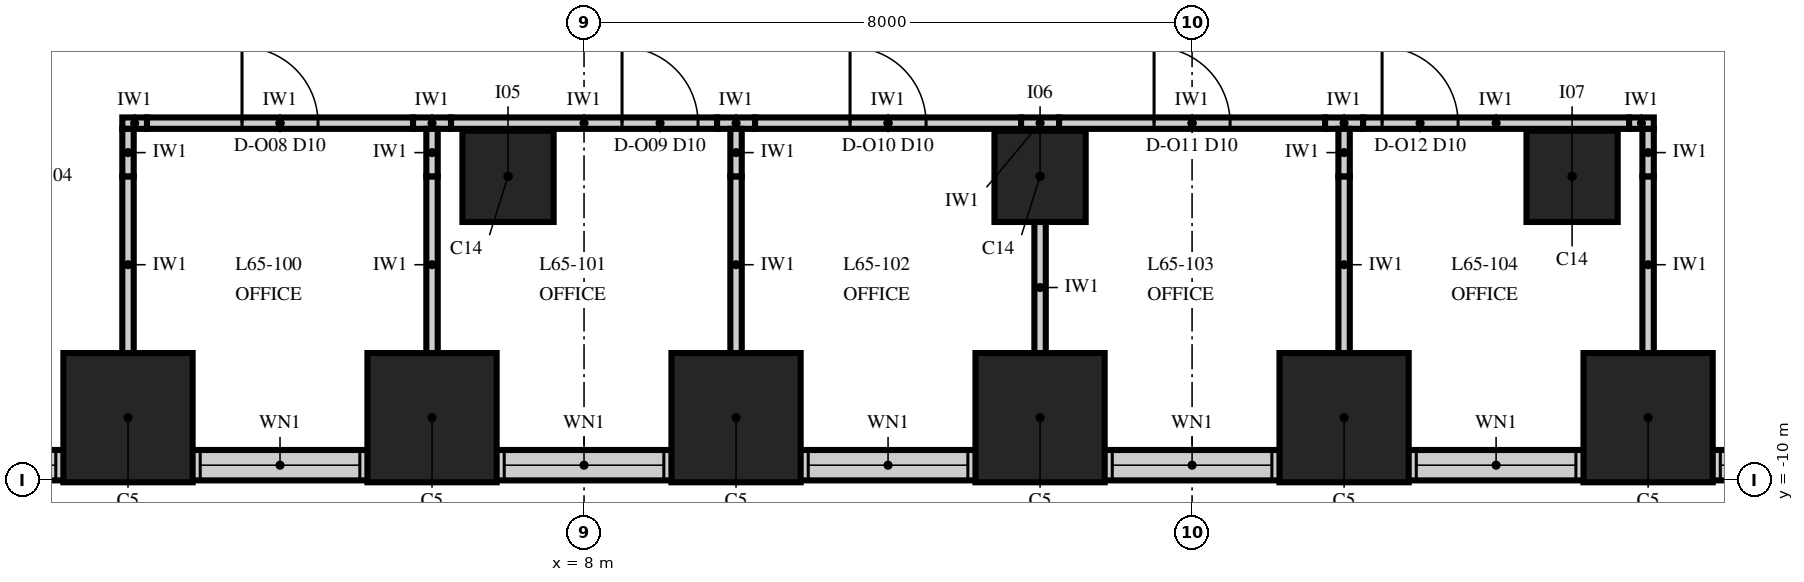
"""IFC4 building model, lengths in metres.
Left out: names, types, materials, properties, quantities, classifications, styles, units other than length and angle.
Written with IfcOpenShell. Run it as: python <this file> out.ifc"""

import sys

from ifc_helpers import new_model, si_unit, direction, frame, frame_2d, origin, origin_2d, place, context, subcontext, project, spatial, rectangle, extrude, element, fill, save


model = new_model("IFC4")
c1 = context("Model", 3, precision=1e-05, world=origin(), true_north=direction((0.0, 1.0)))
c2 = subcontext(c1, "Body", "Model", "MODEL_VIEW")
j1 = project(units=[si_unit("LENGTHUNIT", "METRE"), si_unit("PLANEANGLEUNIT", "RADIAN")], contexts=[c1])
p1 = place(None, origin())
s1 = spatial("IfcSite", under=j1, at=p1, CompositionType="ELEMENT")
p2 = place(p1, origin())
s2 = spatial("IfcBuilding", under=s1, at=p2, CompositionType="ELEMENT")
p3 = place(p2, frame((0.0, 0.0, 280.0)))
s3 = spatial("IfcBuildingStorey", under=s2, at=p3, CompositionType="ELEMENT", Elevation=280.0)
for number, where, z_axis, x_axis in (
    (1, (2.0, -9.175, 0.0), (0.0, 0.0, 1.0), (1.0, 0.0, 0.0)),
    (2, (6.0, -9.175, 0.0), (0.0, 0.0, 1.0), (1.0, 0.0, 0.0)),
    (3, (10.0, -9.175, 0.0), (0.0, 0.0, 1.0), (1.0, 0.0, 0.0)),
    (4, (14.0, -9.175, 0.0), (0.0, 0.0, 1.0), (1.0, 0.0, 0.0)),
    (5, (18.0, -9.175, 0.0), (0.0, 0.0, 1.0), (1.0, 0.0, 0.0)),
    (6, (22.0, -9.175, 0.0), (0.0, 0.0, 1.0), (1.0, 0.0, 0.0)),
):
    element("IfcColumn", number, at=place(p3, frame(where, z_axis=z_axis, x_axis=x_axis)), inside=s3, PredefinedType="COLUMN", context=c2, shape_type="SweptSolid", body=[
        extrude(rectangle(XDim=1.7, YDim=1.7, at=origin_2d()), origin(), (0.0, 0.0, 1.0), 4.0),
    ])
for number, where, z_axis, x_axis in (
    (7, (7.0, -6.0, 0.0), (0.0, 0.0, 1.0), (1.0, 0.0, 0.0)),
    (8, (14.0, -6.0, 0.0), (0.0, 0.0, 1.0), (1.0, 0.0, 0.0)),
    (9, (21.0, -6.0, 0.0), (0.0, 0.0, 1.0), (1.0, 0.0, 0.0)),
):
    element("IfcColumn", number, at=place(p3, frame(where, z_axis=z_axis, x_axis=x_axis)), inside=s3, PredefinedType="COLUMN", context=c2, shape_type="SweptSolid", body=[
        extrude(rectangle(XDim=1.2, YDim=1.2, at=origin_2d()), origin(), (0.0, 0.0, 1.0), 4.0),
    ])
p4 = place(p3, frame((-26.0, -9.8, 0.0), z_axis=(0.0, 0.0, 1.0), x_axis=(1.0, 0.0, 0.0)))
e10 = element("IfcWall", 10, at=p4, inside=s3, PredefinedType="SOLIDWALL", context=c2, shape_type="SweptSolid", body=[
    extrude(rectangle(XDim=52.0, YDim=0.4, at=frame_2d((26.0, 0.0))), origin(), (0.0, 0.0, 1.0), 2.0),
])
p5 = place(p4, frame((0.95, 0.0, 0.8)))
e11 = element("IfcOpeningElement", 11, at=p5, cuts=e10, PredefinedType="OPENING", context=c2, shape_type="SweptSolid", body=[
    extrude(rectangle(XDim=2.1, YDim=1.15, at=frame_2d((1.05, 0.575))), frame((0.0, 0.215, 0.0), z_axis=(0.0, -1.0, 0.0), x_axis=(1.0, 0.0, 0.0)), (0.0, 0.0, 1.0), 0.43),
])
p6 = place(p4, frame((4.95, 0.0, 0.8)))
e12 = element("IfcOpeningElement", 12, at=p6, cuts=e10, PredefinedType="OPENING", context=c2, shape_type="SweptSolid", body=[
    extrude(rectangle(XDim=2.1, YDim=1.15, at=frame_2d((1.05, 0.575))), frame((0.0, 0.215, 0.0), z_axis=(0.0, -1.0, 0.0), x_axis=(1.0, 0.0, 0.0)), (0.0, 0.0, 1.0), 0.43),
])
p7 = place(p4, frame((8.95, 0.0, 0.8)))
e13 = element("IfcOpeningElement", 13, at=p7, cuts=e10, PredefinedType="OPENING", context=c2, shape_type="SweptSolid", body=[
    extrude(rectangle(XDim=2.1, YDim=1.15, at=frame_2d((1.05, 0.575))), frame((0.0, 0.215, 0.0), z_axis=(0.0, -1.0, 0.0), x_axis=(1.0, 0.0, 0.0)), (0.0, 0.0, 1.0), 0.43),
])
p8 = place(p4, frame((12.95, 0.0, 0.8)))
e14 = element("IfcOpeningElement", 14, at=p8, cuts=e10, PredefinedType="OPENING", context=c2, shape_type="SweptSolid", body=[
    extrude(rectangle(XDim=2.1, YDim=1.15, at=frame_2d((1.05, 0.575))), frame((0.0, 0.215, 0.0), z_axis=(0.0, -1.0, 0.0), x_axis=(1.0, 0.0, 0.0)), (0.0, 0.0, 1.0), 0.43),
])
p9 = place(p4, frame((16.95, 0.0, 0.8)))
e15 = element("IfcOpeningElement", 15, at=p9, cuts=e10, PredefinedType="OPENING", context=c2, shape_type="SweptSolid", body=[
    extrude(rectangle(XDim=2.1, YDim=1.15, at=frame_2d((1.05, 0.575))), frame((0.0, 0.215, 0.0), z_axis=(0.0, -1.0, 0.0), x_axis=(1.0, 0.0, 0.0)), (0.0, 0.0, 1.0), 0.43),
])
p10 = place(p4, frame((20.95, 0.0, 0.8)))
e16 = element("IfcOpeningElement", 16, at=p10, cuts=e10, PredefinedType="OPENING", context=c2, shape_type="SweptSolid", body=[
    extrude(rectangle(XDim=2.1, YDim=1.15, at=frame_2d((1.05, 0.575))), frame((0.0, 0.215, 0.0), z_axis=(0.0, -1.0, 0.0), x_axis=(1.0, 0.0, 0.0)), (0.0, 0.0, 1.0), 0.43),
])
p11 = place(p4, frame((24.95, 0.0, 0.8)))
e17 = element("IfcOpeningElement", 17, at=p11, cuts=e10, PredefinedType="OPENING", context=c2, shape_type="SweptSolid", body=[
    extrude(rectangle(XDim=2.1, YDim=1.15, at=frame_2d((1.05, 0.575))), frame((0.0, 0.215, 0.0), z_axis=(0.0, -1.0, 0.0), x_axis=(1.0, 0.0, 0.0)), (0.0, 0.0, 1.0), 0.43),
])
p12 = place(p4, frame((28.95, 0.0, 0.8)))
e18 = element("IfcOpeningElement", 18, at=p12, cuts=e10, PredefinedType="OPENING", context=c2, shape_type="SweptSolid", body=[
    extrude(rectangle(XDim=2.1, YDim=1.15, at=frame_2d((1.05, 0.575))), frame((0.0, 0.215, 0.0), z_axis=(0.0, -1.0, 0.0), x_axis=(1.0, 0.0, 0.0)), (0.0, 0.0, 1.0), 0.43),
])
p13 = place(p4, frame((32.95, 0.0, 0.8)))
e19 = element("IfcOpeningElement", 19, at=p13, cuts=e10, PredefinedType="OPENING", context=c2, shape_type="SweptSolid", body=[
    extrude(rectangle(XDim=2.1, YDim=1.15, at=frame_2d((1.05, 0.575))), frame((0.0, 0.215, 0.0), z_axis=(0.0, -1.0, 0.0), x_axis=(1.0, 0.0, 0.0)), (0.0, 0.0, 1.0), 0.43),
])
p14 = place(p4, frame((36.95, 0.0, 0.8)))
e20 = element("IfcOpeningElement", 20, at=p14, cuts=e10, PredefinedType="OPENING", context=c2, shape_type="SweptSolid", body=[
    extrude(rectangle(XDim=2.1, YDim=1.15, at=frame_2d((1.05, 0.575))), frame((0.0, 0.215, 0.0), z_axis=(0.0, -1.0, 0.0), x_axis=(1.0, 0.0, 0.0)), (0.0, 0.0, 1.0), 0.43),
])
p15 = place(p4, frame((40.95, 0.0, 0.8)))
e21 = element("IfcOpeningElement", 21, at=p15, cuts=e10, PredefinedType="OPENING", context=c2, shape_type="SweptSolid", body=[
    extrude(rectangle(XDim=2.1, YDim=1.15, at=frame_2d((1.05, 0.575))), frame((0.0, 0.215, 0.0), z_axis=(0.0, -1.0, 0.0), x_axis=(1.0, 0.0, 0.0)), (0.0, 0.0, 1.0), 0.43),
])
p16 = place(p4, frame((44.95, 0.0, 0.8)))
e22 = element("IfcOpeningElement", 22, at=p16, cuts=e10, PredefinedType="OPENING", context=c2, shape_type="SweptSolid", body=[
    extrude(rectangle(XDim=2.1, YDim=1.15, at=frame_2d((1.05, 0.575))), frame((0.0, 0.215, 0.0), z_axis=(0.0, -1.0, 0.0), x_axis=(1.0, 0.0, 0.0)), (0.0, 0.0, 1.0), 0.43),
])
p17 = place(p4, frame((48.95, 0.0, 0.8)))
e23 = element("IfcOpeningElement", 23, at=p17, cuts=e10, PredefinedType="OPENING", context=c2, shape_type="SweptSolid", body=[
    extrude(rectangle(XDim=2.1, YDim=1.15, at=frame_2d((1.05, 0.575))), frame((0.0, 0.215, 0.0), z_axis=(0.0, -1.0, 0.0), x_axis=(1.0, 0.0, 0.0)), (0.0, 0.0, 1.0), 0.43),
])
p18 = place(p3, frame((1.925, -5.3, 0.0), z_axis=(0.0, 0.0, 1.0), x_axis=(1.0, 0.0, 0.0)))
e24 = element("IfcWall", 24, at=p18, inside=s3, PredefinedType="PARTITIONING", context=c2, shape_type="SweptSolid", body=[
    extrude(rectangle(XDim=0.325, YDim=0.15, at=frame_2d((0.163, 0.0))), origin(), (0.0, 0.0, 1.0), 2.25),
])
p19 = place(p3, frame((2.25, -5.3, 0.0), z_axis=(0.0, 0.0, 1.0), x_axis=(1.0, 0.0, 0.0)))
e25 = element("IfcWall", 25, at=p19, inside=s3, PredefinedType="PARTITIONING", context=c2, shape_type="SweptSolid", body=[
    extrude(rectangle(XDim=3.5, YDim=0.15, at=frame_2d((1.75, 0.0))), origin(), (0.0, 0.0, 1.0), 3.85),
])
p20 = place(p19, frame((1.25, 0.0, 0.0)))
e26 = element("IfcOpeningElement", 26, at=p20, cuts=e25, PredefinedType="OPENING", context=c2, shape_type="SweptSolid", body=[
    extrude(rectangle(XDim=1.0, YDim=2.3, at=frame_2d((0.5, 1.15))), frame((0.0, 0.09, 0.0), z_axis=(0.0, -1.0, 0.0), x_axis=(1.0, 0.0, 0.0)), (0.0, 0.0, 1.0), 0.18),
])
p21 = place(p3, frame((5.75, -5.3, 0.0), z_axis=(0.0, 0.0, 1.0), x_axis=(1.0, 0.0, 0.0)))
e27 = element("IfcWall", 27, at=p21, inside=s3, PredefinedType="PARTITIONING", context=c2, shape_type="SweptSolid", body=[
    extrude(rectangle(XDim=0.5, YDim=0.15, at=frame_2d((0.25, 0.0))), origin(), (0.0, 0.0, 1.0), 2.25),
])
p22 = place(p3, frame((6.25, -5.3, 0.0), z_axis=(0.0, 0.0, 1.0), x_axis=(1.0, 0.0, 0.0)))
e28 = element("IfcWall", 28, at=p22, inside=s3, PredefinedType="PARTITIONING", context=c2, shape_type="SweptSolid", body=[
    extrude(rectangle(XDim=3.5, YDim=0.15, at=frame_2d((1.75, 0.0))), origin(), (0.0, 0.0, 1.0), 3.85),
])
p23 = place(p22, frame((2.25, 0.0, 0.0)))
e29 = element("IfcOpeningElement", 29, at=p23, cuts=e28, PredefinedType="OPENING", context=c2, shape_type="SweptSolid", body=[
    extrude(rectangle(XDim=1.0, YDim=2.3, at=frame_2d((0.5, 1.15))), frame((0.0, 0.09, 0.0), z_axis=(0.0, -1.0, 0.0), x_axis=(1.0, 0.0, 0.0)), (0.0, 0.0, 1.0), 0.18),
])
p24 = place(p3, frame((9.75, -5.3, 0.0), z_axis=(0.0, 0.0, 1.0), x_axis=(1.0, 0.0, 0.0)))
e30 = element("IfcWall", 30, at=p24, inside=s3, PredefinedType="PARTITIONING", context=c2, shape_type="SweptSolid", body=[
    extrude(rectangle(XDim=0.5, YDim=0.15, at=frame_2d((0.25, 0.0))), origin(), (0.0, 0.0, 1.0), 2.25),
])
p25 = place(p3, frame((10.25, -5.3, 0.0), z_axis=(0.0, 0.0, 1.0), x_axis=(1.0, 0.0, 0.0)))
e31 = element("IfcWall", 31, at=p25, inside=s3, PredefinedType="PARTITIONING", context=c2, shape_type="SweptSolid", body=[
    extrude(rectangle(XDim=3.5, YDim=0.15, at=frame_2d((1.75, 0.0))), origin(), (0.0, 0.0, 1.0), 3.85),
])
p26 = place(p25, frame((1.25, 0.0, 0.0)))
e32 = element("IfcOpeningElement", 32, at=p26, cuts=e31, PredefinedType="OPENING", context=c2, shape_type="SweptSolid", body=[
    extrude(rectangle(XDim=1.0, YDim=2.3, at=frame_2d((0.5, 1.15))), frame((0.0, 0.09, 0.0), z_axis=(0.0, -1.0, 0.0), x_axis=(1.0, 0.0, 0.0)), (0.0, 0.0, 1.0), 0.18),
])
p27 = place(p3, frame((13.75, -5.3, 0.0), z_axis=(0.0, 0.0, 1.0), x_axis=(1.0, 0.0, 0.0)))
e33 = element("IfcWall", 33, at=p27, inside=s3, PredefinedType="PARTITIONING", context=c2, shape_type="SweptSolid", body=[
    extrude(rectangle(XDim=0.5, YDim=0.15, at=frame_2d((0.25, 0.0))), origin(), (0.0, 0.0, 1.0), 2.25),
])
p28 = place(p3, frame((14.25, -5.3, 0.0), z_axis=(0.0, 0.0, 1.0), x_axis=(1.0, 0.0, 0.0)))
e34 = element("IfcWall", 34, at=p28, inside=s3, PredefinedType="PARTITIONING", context=c2, shape_type="SweptSolid", body=[
    extrude(rectangle(XDim=3.5, YDim=0.15, at=frame_2d((1.75, 0.0))), origin(), (0.0, 0.0, 1.0), 3.85),
])
p29 = place(p28, frame((1.25, 0.0, 0.0)))
e35 = element("IfcOpeningElement", 35, at=p29, cuts=e34, PredefinedType="OPENING", context=c2, shape_type="SweptSolid", body=[
    extrude(rectangle(XDim=1.0, YDim=2.3, at=frame_2d((0.5, 1.15))), frame((0.0, 0.09, 0.0), z_axis=(0.0, -1.0, 0.0), x_axis=(1.0, 0.0, 0.0)), (0.0, 0.0, 1.0), 0.18),
])
p30 = place(p3, frame((17.75, -5.3, 0.0), z_axis=(0.0, 0.0, 1.0), x_axis=(1.0, 0.0, 0.0)))
e36 = element("IfcWall", 36, at=p30, inside=s3, PredefinedType="PARTITIONING", context=c2, shape_type="SweptSolid", body=[
    extrude(rectangle(XDim=0.5, YDim=0.15, at=frame_2d((0.25, 0.0))), origin(), (0.0, 0.0, 1.0), 2.25),
])
p31 = place(p3, frame((18.25, -5.3, 0.0), z_axis=(0.0, 0.0, 1.0), x_axis=(1.0, 0.0, 0.0)))
e37 = element("IfcWall", 37, at=p31, inside=s3, PredefinedType="PARTITIONING", context=c2, shape_type="SweptSolid", body=[
    extrude(rectangle(XDim=3.5, YDim=0.15, at=frame_2d((1.75, 0.0))), origin(), (0.0, 0.0, 1.0), 3.85),
])
p32 = place(p31, frame((0.25, 0.0, 0.0)))
e38 = element("IfcOpeningElement", 38, at=p32, cuts=e37, PredefinedType="OPENING", context=c2, shape_type="SweptSolid", body=[
    extrude(rectangle(XDim=1.0, YDim=2.3, at=frame_2d((0.5, 1.15))), frame((0.0, 0.09, 0.0), z_axis=(0.0, -1.0, 0.0), x_axis=(1.0, 0.0, 0.0)), (0.0, 0.0, 1.0), 0.18),
])
p33 = place(p3, frame((21.75, -5.3, 0.0), z_axis=(0.0, 0.0, 1.0), x_axis=(1.0, 0.0, 0.0)))
e39 = element("IfcWall", 39, at=p33, inside=s3, PredefinedType="PARTITIONING", context=c2, shape_type="SweptSolid", body=[
    extrude(rectangle(XDim=0.325, YDim=0.15, at=frame_2d((0.163, 0.0))), origin(), (0.0, 0.0, 1.0), 2.25),
])
p34 = place(p3, frame((2.0, -8.325, 0.0), z_axis=(0.0, 0.0, 1.0), x_axis=(0.0, 1.0, 0.0)))
e40 = element("IfcWall", 40, at=p34, inside=s3, PredefinedType="PARTITIONING", context=c2, shape_type="SweptSolid", body=[
    extrude(rectangle(XDim=2.325, YDim=0.15, at=frame_2d((1.163, 0.0))), origin(), (0.0, 0.0, 1.0), 2.75),
])
p35 = place(p3, frame((2.0, -6.0, 0.0), z_axis=(0.0, 0.0, 1.0), x_axis=(0.0, 1.0, 0.0)))
e41 = element("IfcWall", 41, at=p35, inside=s3, PredefinedType="PARTITIONING", context=c2, shape_type="SweptSolid", body=[
    extrude(rectangle(XDim=0.625, YDim=0.15, at=frame_2d((0.312, 0.0))), origin(), (0.0, 0.0, 1.0), 2.25),
])
p36 = place(p3, frame((6.0, -8.325, 0.0), z_axis=(0.0, 0.0, 1.0), x_axis=(0.0, 1.0, 0.0)))
e42 = element("IfcWall", 42, at=p36, inside=s3, PredefinedType="PARTITIONING", context=c2, shape_type="SweptSolid", body=[
    extrude(rectangle(XDim=2.325, YDim=0.15, at=frame_2d((1.163, 0.0))), origin(), (0.0, 0.0, 1.0), 2.75),
])
p37 = place(p3, frame((6.0, -6.0, 0.0), z_axis=(0.0, 0.0, 1.0), x_axis=(0.0, 1.0, 0.0)))
e43 = element("IfcWall", 43, at=p37, inside=s3, PredefinedType="PARTITIONING", context=c2, shape_type="SweptSolid", body=[
    extrude(rectangle(XDim=0.625, YDim=0.15, at=frame_2d((0.312, 0.0))), origin(), (0.0, 0.0, 1.0), 2.25),
])
p38 = place(p3, frame((10.0, -8.325, 0.0), z_axis=(0.0, 0.0, 1.0), x_axis=(0.0, 1.0, 0.0)))
e44 = element("IfcWall", 44, at=p38, inside=s3, PredefinedType="PARTITIONING", context=c2, shape_type="SweptSolid", body=[
    extrude(rectangle(XDim=2.325, YDim=0.15, at=frame_2d((1.163, 0.0))), origin(), (0.0, 0.0, 1.0), 2.75),
])
p39 = place(p3, frame((10.0, -6.0, 0.0), z_axis=(0.0, 0.0, 1.0), x_axis=(0.0, 1.0, 0.0)))
e45 = element("IfcWall", 45, at=p39, inside=s3, PredefinedType="PARTITIONING", context=c2, shape_type="SweptSolid", body=[
    extrude(rectangle(XDim=0.625, YDim=0.15, at=frame_2d((0.312, 0.0))), origin(), (0.0, 0.0, 1.0), 2.25),
])
p40 = place(p3, frame((14.0, -8.325, 0.0), z_axis=(0.0, 0.0, 1.0), x_axis=(0.0, 1.0, 0.0)))
e46 = element("IfcWall", 46, at=p40, inside=s3, PredefinedType="PARTITIONING", context=c2, shape_type="SweptSolid", body=[
    extrude(rectangle(XDim=1.725, YDim=0.15, at=frame_2d((0.862, 0.0))), origin(), (0.0, 0.0, 1.0), 3.13),
])
p41 = place(p3, frame((18.0, -8.325, 0.0), z_axis=(0.0, 0.0, 1.0), x_axis=(0.0, 1.0, 0.0)))
e47 = element("IfcWall", 47, at=p41, inside=s3, PredefinedType="PARTITIONING", context=c2, shape_type="SweptSolid", body=[
    extrude(rectangle(XDim=2.325, YDim=0.15, at=frame_2d((1.163, 0.0))), origin(), (0.0, 0.0, 1.0), 2.75),
])
p42 = place(p3, frame((18.0, -6.0, 0.0), z_axis=(0.0, 0.0, 1.0), x_axis=(0.0, 1.0, 0.0)))
e48 = element("IfcWall", 48, at=p42, inside=s3, PredefinedType="PARTITIONING", context=c2, shape_type="SweptSolid", body=[
    extrude(rectangle(XDim=0.625, YDim=0.15, at=frame_2d((0.312, 0.0))), origin(), (0.0, 0.0, 1.0), 2.25),
])
p43 = place(p3, frame((22.0, -8.325, 0.0), z_axis=(0.0, 0.0, 1.0), x_axis=(0.0, 1.0, 0.0)))
e49 = element("IfcWall", 49, at=p43, inside=s3, PredefinedType="PARTITIONING", context=c2, shape_type="SweptSolid", body=[
    extrude(rectangle(XDim=2.325, YDim=0.15, at=frame_2d((1.163, 0.0))), origin(), (0.0, 0.0, 1.0), 2.75),
])
p44 = place(p3, frame((22.0, -6.0, 0.0), z_axis=(0.0, 0.0, 1.0), x_axis=(0.0, 1.0, 0.0)))
e50 = element("IfcWall", 50, at=p44, inside=s3, PredefinedType="PARTITIONING", context=c2, shape_type="SweptSolid", body=[
    extrude(rectangle(XDim=0.625, YDim=0.15, at=frame_2d((0.312, 0.0))), origin(), (0.0, 0.0, 1.0), 2.25),
])
p45 = place(p11, origin())
e51 = element("IfcWindow", 51, at=p45, inside=s3, PartitioningType="SINGLE_PANEL", PredefinedType="WINDOW", context=c2, shape_type="SweptSolid", body=[
    extrude(rectangle(XDim=2.1, YDim=1.15, at=frame_2d((1.05, 0.575))), frame((0.0, 0.03, 0.0), z_axis=(0.0, -1.0, 0.0), x_axis=(1.0, 0.0, 0.0)), (0.0, 0.0, 1.0), 0.06),
])
fill(e17, e51)
p46 = place(p12, origin())
e52 = element("IfcWindow", 52, at=p46, inside=s3, PartitioningType="SINGLE_PANEL", PredefinedType="WINDOW", context=c2, shape_type="SweptSolid", body=[
    extrude(rectangle(XDim=2.1, YDim=1.15, at=frame_2d((1.05, 0.575))), frame((0.0, 0.03, 0.0), z_axis=(0.0, -1.0, 0.0), x_axis=(1.0, 0.0, 0.0)), (0.0, 0.0, 1.0), 0.06),
])
fill(e18, e52)
p47 = place(p13, origin())
e53 = element("IfcWindow", 53, at=p47, inside=s3, PartitioningType="SINGLE_PANEL", PredefinedType="WINDOW", context=c2, shape_type="SweptSolid", body=[
    extrude(rectangle(XDim=2.1, YDim=1.15, at=frame_2d((1.05, 0.575))), frame((0.0, 0.03, 0.0), z_axis=(0.0, -1.0, 0.0), x_axis=(1.0, 0.0, 0.0)), (0.0, 0.0, 1.0), 0.06),
])
fill(e19, e53)
p48 = place(p14, origin())
e54 = element("IfcWindow", 54, at=p48, inside=s3, PartitioningType="SINGLE_PANEL", PredefinedType="WINDOW", context=c2, shape_type="SweptSolid", body=[
    extrude(rectangle(XDim=2.1, YDim=1.15, at=frame_2d((1.05, 0.575))), frame((0.0, 0.03, 0.0), z_axis=(0.0, -1.0, 0.0), x_axis=(1.0, 0.0, 0.0)), (0.0, 0.0, 1.0), 0.06),
])
fill(e20, e54)
p49 = place(p15, origin())
e55 = element("IfcWindow", 55, at=p49, inside=s3, PartitioningType="SINGLE_PANEL", PredefinedType="WINDOW", context=c2, shape_type="SweptSolid", body=[
    extrude(rectangle(XDim=2.1, YDim=1.15, at=frame_2d((1.05, 0.575))), frame((0.0, 0.03, 0.0), z_axis=(0.0, -1.0, 0.0), x_axis=(1.0, 0.0, 0.0)), (0.0, 0.0, 1.0), 0.06),
])
fill(e21, e55)
p50 = place(p16, origin())
e56 = element("IfcWindow", 56, at=p50, inside=s3, PartitioningType="SINGLE_PANEL", PredefinedType="WINDOW", context=c2, shape_type="SweptSolid", body=[
    extrude(rectangle(XDim=2.1, YDim=1.15, at=frame_2d((1.05, 0.575))), frame((0.0, 0.03, 0.0), z_axis=(0.0, -1.0, 0.0), x_axis=(1.0, 0.0, 0.0)), (0.0, 0.0, 1.0), 0.06),
])
fill(e22, e56)
p51 = place(p17, origin())
e57 = element("IfcWindow", 57, at=p51, inside=s3, PartitioningType="SINGLE_PANEL", PredefinedType="WINDOW", context=c2, shape_type="SweptSolid", body=[
    extrude(rectangle(XDim=2.1, YDim=1.15, at=frame_2d((1.05, 0.575))), frame((0.0, 0.03, 0.0), z_axis=(0.0, -1.0, 0.0), x_axis=(1.0, 0.0, 0.0)), (0.0, 0.0, 1.0), 0.06),
])
fill(e23, e57)
p52 = place(p20, origin())
e58 = element("IfcDoor", 58, at=p52, inside=s3, OperationType="SINGLE_SWING_LEFT", PredefinedType="DOOR", context=c2, shape_type="SweptSolid", body=[
    extrude(rectangle(XDim=1.0, YDim=2.3, at=frame_2d((0.5, 1.15))), frame((0.0, 0.075, 0.0), z_axis=(0.0, -1.0, 0.0), x_axis=(1.0, 0.0, 0.0)), (0.0, 0.0, 1.0), 0.149),
])
fill(e26, e58)
p53 = place(p23, origin())
e59 = element("IfcDoor", 59, at=p53, inside=s3, OperationType="SINGLE_SWING_LEFT", PredefinedType="DOOR", context=c2, shape_type="SweptSolid", body=[
    extrude(rectangle(XDim=1.0, YDim=2.3, at=frame_2d((0.5, 1.15))), frame((0.0, 0.075, 0.0), z_axis=(0.0, -1.0, 0.0), x_axis=(1.0, 0.0, 0.0)), (0.0, 0.0, 1.0), 0.149),
])
fill(e29, e59)
p54 = place(p26, origin())
e60 = element("IfcDoor", 60, at=p54, inside=s3, OperationType="SINGLE_SWING_LEFT", PredefinedType="DOOR", context=c2, shape_type="SweptSolid", body=[
    extrude(rectangle(XDim=1.0, YDim=2.3, at=frame_2d((0.5, 1.15))), frame((0.0, 0.075, 0.0), z_axis=(0.0, -1.0, 0.0), x_axis=(1.0, 0.0, 0.0)), (0.0, 0.0, 1.0), 0.149),
])
fill(e32, e60)
p55 = place(p29, origin())
e61 = element("IfcDoor", 61, at=p55, inside=s3, OperationType="SINGLE_SWING_LEFT", PredefinedType="DOOR", context=c2, shape_type="SweptSolid", body=[
    extrude(rectangle(XDim=1.0, YDim=2.3, at=frame_2d((0.5, 1.15))), frame((0.0, 0.075, 0.0), z_axis=(0.0, -1.0, 0.0), x_axis=(1.0, 0.0, 0.0)), (0.0, 0.0, 1.0), 0.149),
])
fill(e35, e61)
p56 = place(p32, origin())
e62 = element("IfcDoor", 62, at=p56, inside=s3, OperationType="SINGLE_SWING_LEFT", PredefinedType="DOOR", context=c2, shape_type="SweptSolid", body=[
    extrude(rectangle(XDim=1.0, YDim=2.3, at=frame_2d((0.5, 1.15))), frame((0.0, 0.075, 0.0), z_axis=(0.0, -1.0, 0.0), x_axis=(1.0, 0.0, 0.0)), (0.0, 0.0, 1.0), 0.149),
])
fill(e38, e62)
save(model, sys.argv[1])
